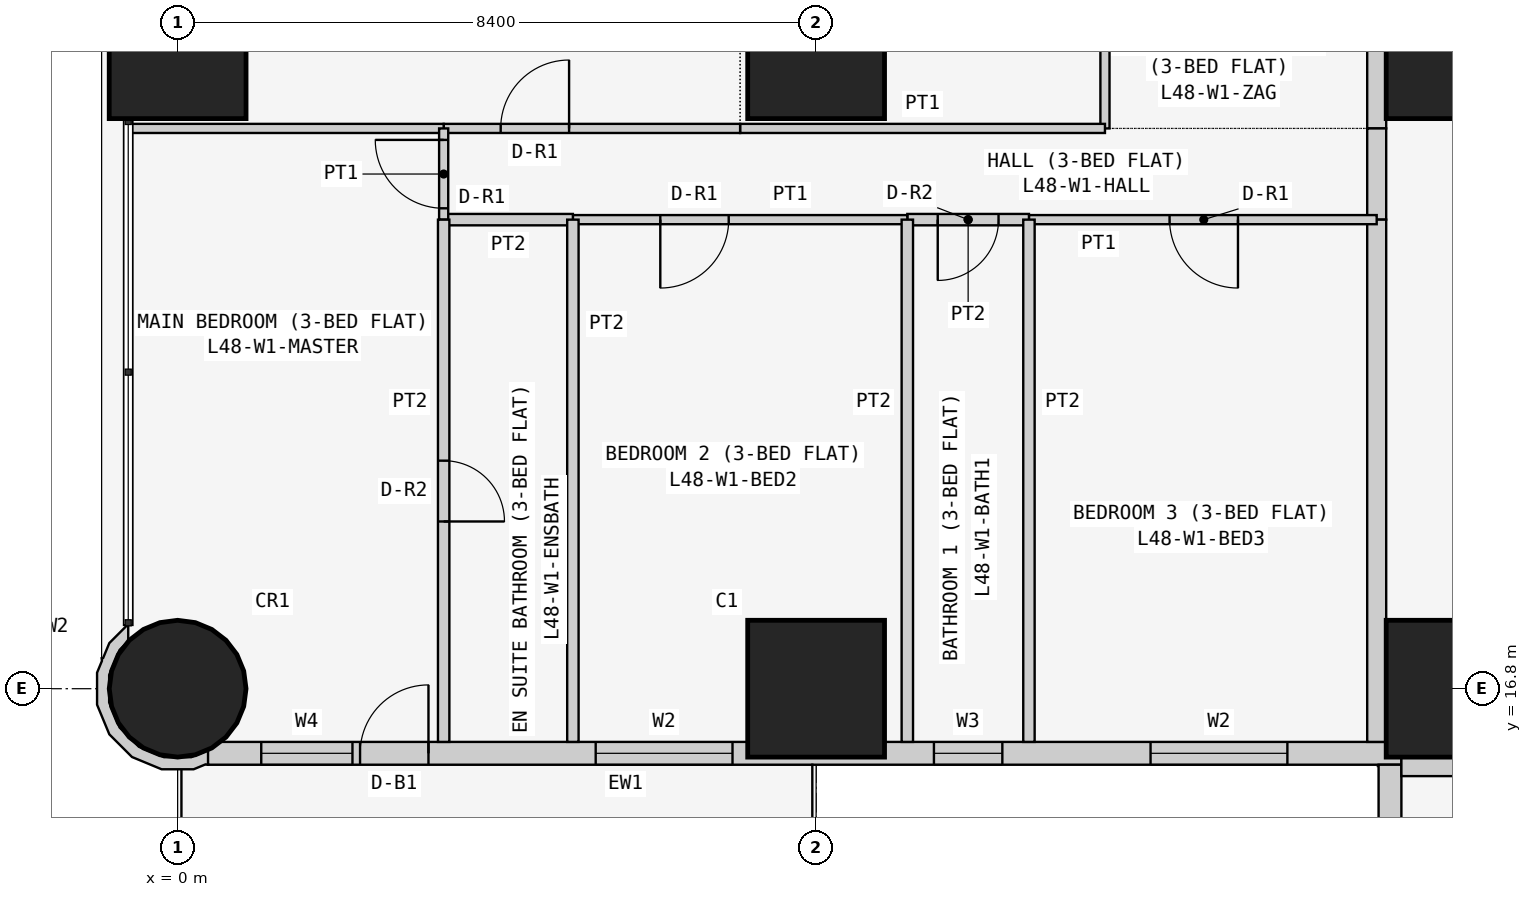
"""IFC4 building model, lengths in metres.
Left out: names, types, materials, properties, quantities, classifications, styles, units other than length and angle.
Written with IfcOpenShell. Run it as: python <this file> out.ifc"""

import sys

from ifc_helpers import new_model, si_unit, direction, frame, frame_2d, origin, origin_2d, place, context, subcontext, project, spatial, polyline, rectangle, circle, outline, extrude, element, fill, save


model = new_model("IFC4")
c1 = context("Model", 3, precision=1e-05, world=origin(), true_north=direction((0.0, 1.0)))
c2 = subcontext(c1, "Body", "Model", "MODEL_VIEW")
j1 = project(units=[si_unit("LENGTHUNIT", "METRE"), si_unit("PLANEANGLEUNIT", "RADIAN")], contexts=[c1])
p1 = place(None, origin())
s1 = spatial("IfcSite", under=j1, at=p1, CompositionType="ELEMENT")
p2 = place(p1, origin())
s2 = spatial("IfcBuilding", under=s1, at=p2, CompositionType="ELEMENT")
p3 = place(p2, frame((0.0, 0.0, 186.9)))
s3 = spatial("IfcBuildingStorey", under=s2, at=p3, CompositionType="ELEMENT", Elevation=186.9)
p4 = place(p3, frame((0.0, 16.8, 0.0), z_axis=(0.0, 0.0, 1.0), x_axis=(1.0, 0.0, 0.0)))
e1 = element("IfcColumn", 1, at=p4, inside=s3, PredefinedType="COLUMN", context=c2, shape_type="SweptSolid", body=[
    extrude(circle(Radius=0.9, at=origin_2d()), origin(), (0.0, 0.0, 1.0), 3.6),
])
for number, where, z_axis, x_axis in (
    (2, (0.0, 25.2, 0.0), (0.0, 0.0, 1.0), (1.0, 0.0, 0.0)),
    (3, (8.4, 16.8, 0.0), (0.0, 0.0, 1.0), (1.0, 0.0, 0.0)),
    (4, (8.4, 25.2, 0.0), (0.0, 0.0, 1.0), (1.0, 0.0, 0.0)),
    (5, (16.8, 16.8, 0.0), (0.0, 0.0, 1.0), (1.0, 0.0, 0.0)),
    (6, (16.8, 25.2, 0.0), (0.0, 0.0, 1.0), (1.0, 0.0, 0.0)),
):
    element("IfcColumn", number, at=place(p3, frame(where, z_axis=z_axis, x_axis=x_axis)), inside=s3, PredefinedType="COLUMN", context=c2, shape_type="SweptSolid", body=[
        extrude(rectangle(XDim=1.8, YDim=1.8, at=origin_2d()), origin(), (0.0, 0.0, 1.0), 3.6),
    ])
p5 = place(p3, frame((0.4, 15.95, 0.0), z_axis=(0.0, 0.0, 1.0), x_axis=(1.0, 0.0, 0.0)))
e7 = element("IfcWall", 7, at=p5, inside=s3, PredefinedType="SOLIDWALL", context=c2, shape_type="SweptSolid", body=[
    extrude(rectangle(XDim=15.7, YDim=0.3, at=frame_2d((7.85, 0.0))), origin(), (0.0, 0.0, 1.0), 3.45),
])
p6 = place(p5, frame((12.4, 0.0, 0.9)))
e8 = element("IfcOpeningElement", 8, at=p6, cuts=e7, PredefinedType="OPENING", context=c2, shape_type="SweptSolid", body=[
    extrude(rectangle(XDim=1.8, YDim=1.5, at=frame_2d((0.9, 0.75))), frame((0.0, 0.16, 0.0), z_axis=(0.0, -1.0, 0.0), x_axis=(1.0, 0.0, 0.0)), (0.0, 0.0, 1.0), 0.32),
])
p7 = place(p5, frame((9.55, 0.0, 1.5)))
e9 = element("IfcOpeningElement", 9, at=p7, cuts=e7, PredefinedType="OPENING", context=c2, shape_type="SweptSolid", body=[
    extrude(rectangle(XDim=0.9, YDim=0.7, at=frame_2d((0.45, 0.35))), frame((0.0, 0.16, 0.0), z_axis=(0.0, -1.0, 0.0), x_axis=(1.0, 0.0, 0.0)), (0.0, 0.0, 1.0), 0.32),
])
p8 = place(p5, frame((5.1, 0.0, 0.9)))
e10 = element("IfcOpeningElement", 10, at=p8, cuts=e7, PredefinedType="OPENING", context=c2, shape_type="SweptSolid", body=[
    extrude(rectangle(XDim=1.8, YDim=1.5, at=frame_2d((0.9, 0.75))), frame((0.0, 0.16, 0.0), z_axis=(0.0, -1.0, 0.0), x_axis=(1.0, 0.0, 0.0)), (0.0, 0.0, 1.0), 0.32),
])
p9 = place(p5, frame((2.0, 0.0, 0.0)))
e11 = element("IfcOpeningElement", 11, at=p9, cuts=e7, PredefinedType="OPENING", context=c2, shape_type="SweptSolid", body=[
    extrude(rectangle(XDim=0.9, YDim=2.4, at=frame_2d((0.45, 1.2))), frame((0.0, 0.16, 0.0), z_axis=(0.0, -1.0, 0.0), x_axis=(1.0, 0.0, 0.0)), (0.0, 0.0, 1.0), 0.32),
])
p10 = place(p5, frame((0.7, 0.0, 0.9)))
e12 = element("IfcOpeningElement", 12, at=p10, cuts=e7, PredefinedType="OPENING", context=c2, shape_type="SweptSolid", body=[
    extrude(rectangle(XDim=1.2, YDim=1.5, at=frame_2d((0.6, 0.75))), frame((0.0, 0.16, 0.0), z_axis=(0.0, -1.0, 0.0), x_axis=(1.0, 0.0, 0.0)), (0.0, 0.0, 1.0), 0.32),
])
p11 = place(p3, frame((15.95, 15.8, 0.0), z_axis=(0.0, 0.0, 1.0), x_axis=(0.0, -1.0, 0.0)))
e13 = element("IfcWall", 13, at=p11, inside=s3, PredefinedType="SOLIDWALL", context=c2, shape_type="SweptSolid", body=[
    extrude(rectangle(XDim=7.0, YDim=0.3, at=frame_2d((3.5, 0.0))), origin(), (0.0, 0.0, 1.0), 3.45),
])
p12 = place(p11, frame((1.5, 0.0, 0.9)))
e14 = element("IfcOpeningElement", 14, at=p12, cuts=e13, PredefinedType="OPENING", context=c2, shape_type="SweptSolid", body=[
    extrude(rectangle(XDim=2.4, YDim=1.5, at=frame_2d((1.2, 0.75))), frame((0.0, 0.16, 0.0), z_axis=(0.0, -1.0, 0.0), x_axis=(1.0, 0.0, 0.0)), (0.0, 0.0, 1.0), 0.32),
])
p13 = place(p11, frame((5.05, 0.0, 0.9)))
e15 = element("IfcOpeningElement", 15, at=p13, cuts=e13, PredefinedType="OPENING", context=c2, shape_type="SweptSolid", body=[
    extrude(rectangle(XDim=1.2, YDim=1.5, at=frame_2d((0.6, 0.75))), frame((0.0, 0.16, 0.0), z_axis=(0.0, -1.0, 0.0), x_axis=(1.0, 0.0, 0.0)), (0.0, 0.0, 1.0), 0.32),
])
p14 = place(p3, frame((-0.611, 17.567, 0.0), z_axis=(0.0, 0.0, 1.0), x_axis=(-0.926129809145, -0.377204953059, 0.0)))
e16 = element("IfcWall", 16, at=p14, inside=s3, PredefinedType="SOLIDWALL", context=c2, shape_type="SweptSolid", body=[
    extrude(outline(polyline([(-0.269, 2.017), (-0.37, 1.841), (-0.102, 1.842), (0.23, 1.707), (0.485, 1.455), (0.624, 1.125), (0.626, 0.766), (0.49, 0.434), (0.239, 0.179), (0.09, 0.117), (0.011, -0.078), (0.024, -0.083), (0.33, 0.045), (0.48, 0.197), (0.499, 0.193), (0.508, 0.225), (0.626, 0.345), (0.785, 0.736), (0.782, 1.157), (0.619, 1.546), (0.319, 1.842), (-0.072, 2.001), (-0.24, 2.0), (-0.269, 2.017)])), origin(), (0.0, 0.0, 1.0), 3.45),
])
p15 = place(p3, frame((22.971, 15.775, 0.0), z_axis=(0.0, 0.0, 1.0), x_axis=(-1.0, 0.0, 0.0)))
e17 = element("IfcWall", 17, at=p15, inside=s3, PredefinedType="PARTITIONING", context=c2, shape_type="SweptSolid", body=[
    extrude(rectangle(XDim=6.871, YDim=0.25, at=frame_2d((3.436, 0.0))), origin(), (0.0, 0.0, 1.0), 3.45),
])
p16 = place(p3, frame((15.775, 24.171, 0.0), z_axis=(0.0, 0.0, 1.0), x_axis=(0.0, 1.0, 0.0)))
e18 = element("IfcWall", 18, at=p16, inside=s3, PredefinedType="PARTITIONING", context=c2, shape_type="SweptSolid", body=[
    extrude(rectangle(XDim=5.229, YDim=0.25, at=frame_2d((2.615, 0.0))), origin(), (0.0, 0.0, 1.0), 3.45),
])
p17 = place(p16, frame((2.129, 0.0, 0.0)))
e19 = element("IfcOpeningElement", 19, at=p17, cuts=e18, PredefinedType="OPENING", context=c2, shape_type="SweptSolid", body=[
    extrude(rectangle(XDim=1.0, YDim=2.1, at=frame_2d((0.5, 1.05))), frame((0.0, 0.135, 0.0), z_axis=(0.0, -1.0, 0.0), x_axis=(1.0, 0.0, 0.0)), (0.0, 0.0, 1.0), 0.27),
])
p18 = place(p3, frame((15.775, 22.971, 0.0), z_axis=(0.0, 0.0, 1.0), x_axis=(0.0, 1.0, 0.0)))
e20 = element("IfcWall", 20, at=p18, inside=s3, PredefinedType="PARTITIONING", context=c2, shape_type="SweptSolid", body=[
    extrude(rectangle(XDim=1.2, YDim=0.25, at=frame_2d((0.6, 0.0))), origin(), (0.0, 0.0, 1.0), 3.45),
])
p19 = place(p3, frame((15.775, 16.1, 0.0), z_axis=(0.0, 0.0, 1.0), x_axis=(0.0, 1.0, 0.0)))
e21 = element("IfcWall", 21, at=p19, inside=s3, PredefinedType="PARTITIONING", context=c2, shape_type="SweptSolid", body=[
    extrude(rectangle(XDim=6.871, YDim=0.25, at=frame_2d((3.436, 0.0))), origin(), (0.0, 0.0, 1.0), 3.45),
])
p20 = place(p3, frame((12.2, 29.4, 0.0), z_axis=(0.0, 0.0, 1.0), x_axis=(0.0, -1.0, 0.0)))
e22 = element("IfcWall", 22, at=p20, inside=s3, PredefinedType="PARTITIONING", context=c2, shape_type="SweptSolid", body=[
    extrude(rectangle(XDim=5.229, YDim=0.12, at=frame_2d((2.615, 0.0))), origin(), (0.0, 0.0, 1.0), 3.45),
])
p21 = place(p20, frame((1.05, 0.0, 0.0)))
e23 = element("IfcOpeningElement", 23, at=p21, cuts=e22, PredefinedType="OPENING", context=c2, shape_type="SweptSolid", body=[
    extrude(rectangle(XDim=0.9, YDim=2.1, at=frame_2d((0.45, 1.05))), frame((0.0, 0.07, 0.0), z_axis=(0.0, -1.0, 0.0), x_axis=(1.0, 0.0, 0.0)), (0.0, 0.0, 1.0), 0.14),
])
p22 = place(p3, frame((7.4, 24.171, 0.0), z_axis=(0.0, 0.0, 1.0), x_axis=(1.0, 0.0, 0.0)))
e24 = element("IfcWall", 24, at=p22, inside=s3, PredefinedType="PARTITIONING", context=c2, shape_type="SweptSolid", body=[
    extrude(rectangle(XDim=4.8, YDim=0.12, at=frame_2d((2.4, 0.0))), origin(), (0.0, 0.0, 1.0), 3.45),
])
p23 = place(p3, frame((3.5, 24.171, 0.0), z_axis=(0.0, 0.0, 1.0), x_axis=(1.0, 0.0, 0.0)))
e25 = element("IfcWall", 25, at=p23, inside=s3, PredefinedType="PARTITIONING", context=c2, shape_type="SweptSolid", body=[
    extrude(rectangle(XDim=3.9, YDim=0.12, at=frame_2d((1.95, 0.0))), origin(), (0.0, 0.0, 1.0), 3.45),
])
p24 = place(p23, frame((0.75, 0.0, 0.0)))
e26 = element("IfcOpeningElement", 26, at=p24, cuts=e25, PredefinedType="OPENING", context=c2, shape_type="SweptSolid", body=[
    extrude(rectangle(XDim=0.9, YDim=2.1, at=frame_2d((0.45, 1.05))), frame((0.0, 0.07, 0.0), z_axis=(0.0, -1.0, 0.0), x_axis=(1.0, 0.0, 0.0)), (0.0, 0.0, 1.0), 0.14),
])
p25 = place(p3, frame((-0.65, 24.171, 0.0), z_axis=(0.0, 0.0, 1.0), x_axis=(1.0, 0.0, 0.0)))
e27 = element("IfcWall", 27, at=p25, inside=s3, PredefinedType="PARTITIONING", context=c2, shape_type="SweptSolid", body=[
    extrude(rectangle(XDim=4.15, YDim=0.12, at=frame_2d((2.075, 0.0))), origin(), (0.0, 0.0, 1.0), 3.45),
])
p26 = place(p3, frame((11.2, 22.971, 0.0), z_axis=(0.0, 0.0, 1.0), x_axis=(1.0, 0.0, 0.0)))
e28 = element("IfcWall", 28, at=p26, inside=s3, PredefinedType="PARTITIONING", context=c2, shape_type="SweptSolid", body=[
    extrude(rectangle(XDim=4.575, YDim=0.12, at=frame_2d((2.288, 0.0))), origin(), (0.0, 0.0, 1.0), 3.45),
])
p27 = place(p26, frame((1.85, 0.0, 0.0)))
e29 = element("IfcOpeningElement", 29, at=p27, cuts=e28, PredefinedType="OPENING", context=c2, shape_type="SweptSolid", body=[
    extrude(rectangle(XDim=0.9, YDim=2.1, at=frame_2d((0.45, 1.05))), frame((0.0, 0.07, 0.0), z_axis=(0.0, -1.0, 0.0), x_axis=(1.0, 0.0, 0.0)), (0.0, 0.0, 1.0), 0.14),
])
p28 = place(p3, frame((9.6, 22.971, 0.0), z_axis=(0.0, 0.0, 1.0), x_axis=(1.0, 0.0, 0.0)))
e30 = element("IfcWall", 30, at=p28, inside=s3, PredefinedType="PARTITIONING", context=c2, shape_type="SweptSolid", body=[
    extrude(rectangle(XDim=1.6, YDim=0.15, at=frame_2d((0.8, 0.0))), origin(), (0.0, 0.0, 1.0), 3.45),
])
p29 = place(p28, frame((0.4, 0.0, 0.0)))
e31 = element("IfcOpeningElement", 31, at=p29, cuts=e30, PredefinedType="OPENING", context=c2, shape_type="SweptSolid", body=[
    extrude(rectangle(XDim=0.8, YDim=2.1, at=frame_2d((0.4, 1.05))), frame((0.0, 0.085, 0.0), z_axis=(0.0, -1.0, 0.0), x_axis=(1.0, 0.0, 0.0)), (0.0, 0.0, 1.0), 0.17),
])
p30 = place(p3, frame((5.2, 22.971, 0.0), z_axis=(0.0, 0.0, 1.0), x_axis=(1.0, 0.0, 0.0)))
e32 = element("IfcWall", 32, at=p30, inside=s3, PredefinedType="PARTITIONING", context=c2, shape_type="SweptSolid", body=[
    extrude(rectangle(XDim=4.4, YDim=0.12, at=frame_2d((2.2, 0.0))), origin(), (0.0, 0.0, 1.0), 3.45),
])
p31 = place(p30, frame((1.15, 0.0, 0.0)))
e33 = element("IfcOpeningElement", 33, at=p31, cuts=e32, PredefinedType="OPENING", context=c2, shape_type="SweptSolid", body=[
    extrude(rectangle(XDim=0.9, YDim=2.1, at=frame_2d((0.45, 1.05))), frame((0.0, 0.07, 0.0), z_axis=(0.0, -1.0, 0.0), x_axis=(1.0, 0.0, 0.0)), (0.0, 0.0, 1.0), 0.14),
])
p32 = place(p3, frame((3.5, 22.971, 0.0), z_axis=(0.0, 0.0, 1.0), x_axis=(1.0, 0.0, 0.0)))
e34 = element("IfcWall", 34, at=p32, inside=s3, PredefinedType="PARTITIONING", context=c2, shape_type="SweptSolid", body=[
    extrude(rectangle(XDim=1.7, YDim=0.15, at=frame_2d((0.85, 0.0))), origin(), (0.0, 0.0, 1.0), 3.45),
])
p33 = place(p3, frame((3.5, 24.171, 0.0), z_axis=(0.0, 0.0, 1.0), x_axis=(0.0, -1.0, 0.0)))
e35 = element("IfcWall", 35, at=p33, inside=s3, PredefinedType="PARTITIONING", context=c2, shape_type="SweptSolid", body=[
    extrude(rectangle(XDim=1.2, YDim=0.12, at=frame_2d((0.6, 0.0))), origin(), (0.0, 0.0, 1.0), 3.45),
])
p34 = place(p33, frame((0.151, 0.0, 0.0)))
e36 = element("IfcOpeningElement", 36, at=p34, cuts=e35, PredefinedType="OPENING", context=c2, shape_type="SweptSolid", body=[
    extrude(rectangle(XDim=0.9, YDim=2.1, at=frame_2d((0.45, 1.05))), frame((0.0, 0.07, 0.0), z_axis=(0.0, -1.0, 0.0), x_axis=(1.0, 0.0, 0.0)), (0.0, 0.0, 1.0), 0.14),
])
for number, where, z_axis, x_axis in (
    (37, (11.2, 22.971, 0.0), (0.0, 0.0, 1.0), (0.0, -1.0, 0.0)),
    (38, (9.6, 22.971, 0.0), (0.0, 0.0, 1.0), (0.0, -1.0, 0.0)),
    (39, (5.2, 22.971, 0.0), (0.0, 0.0, 1.0), (0.0, -1.0, 0.0)),
):
    element("IfcWall", number, at=place(p3, frame(where, z_axis=z_axis, x_axis=x_axis)), inside=s3, PredefinedType="PARTITIONING", context=c2, shape_type="SweptSolid", body=[
        extrude(rectangle(XDim=6.871, YDim=0.15, at=frame_2d((3.436, 0.0))), origin(), (0.0, 0.0, 1.0), 3.45),
    ])
p35 = place(p3, frame((3.5, 22.971, 0.0), z_axis=(0.0, 0.0, 1.0), x_axis=(0.0, -1.0, 0.0)))
e40 = element("IfcWall", 40, at=p35, inside=s3, PredefinedType="PARTITIONING", context=c2, shape_type="SweptSolid", body=[
    extrude(rectangle(XDim=6.871, YDim=0.15, at=frame_2d((3.436, 0.0))), origin(), (0.0, 0.0, 1.0), 3.45),
])
p36 = place(p35, frame((3.171, 0.0, 0.0)))
e41 = element("IfcOpeningElement", 41, at=p36, cuts=e40, PredefinedType="OPENING", context=c2, shape_type="SweptSolid", body=[
    extrude(rectangle(XDim=0.8, YDim=2.1, at=frame_2d((0.4, 1.05))), frame((0.0, 0.085, 0.0), z_axis=(0.0, -1.0, 0.0), x_axis=(1.0, 0.0, 0.0)), (0.0, 0.0, 1.0), 0.17),
])
p37 = place(p6, origin())
e42 = element("IfcWindow", 42, at=p37, inside=s3, PartitioningType="SINGLE_PANEL", PredefinedType="WINDOW", context=c2, shape_type="SweptSolid", body=[
    extrude(rectangle(XDim=1.8, YDim=1.5, at=frame_2d((0.9, 0.75))), frame((0.0, 0.03, 0.0), z_axis=(0.0, -1.0, 0.0), x_axis=(1.0, 0.0, 0.0)), (0.0, 0.0, 1.0), 0.06),
])
fill(e8, e42)
p38 = place(p7, origin())
e43 = element("IfcWindow", 43, at=p38, inside=s3, PartitioningType="SINGLE_PANEL", PredefinedType="WINDOW", context=c2, shape_type="SweptSolid", body=[
    extrude(rectangle(XDim=0.9, YDim=0.7, at=frame_2d((0.45, 0.35))), frame((0.0, 0.03, 0.0), z_axis=(0.0, -1.0, 0.0), x_axis=(1.0, 0.0, 0.0)), (0.0, 0.0, 1.0), 0.06),
])
fill(e9, e43)
p39 = place(p8, origin())
e44 = element("IfcWindow", 44, at=p39, inside=s3, PartitioningType="SINGLE_PANEL", PredefinedType="WINDOW", context=c2, shape_type="SweptSolid", body=[
    extrude(rectangle(XDim=1.8, YDim=1.5, at=frame_2d((0.9, 0.75))), frame((0.0, 0.03, 0.0), z_axis=(0.0, -1.0, 0.0), x_axis=(1.0, 0.0, 0.0)), (0.0, 0.0, 1.0), 0.06),
])
fill(e10, e44)
p40 = place(p9, origin())
e45 = element("IfcDoor", 45, at=p40, inside=s3, OperationType="SINGLE_SWING_RIGHT", PredefinedType="DOOR", context=c2, shape_type="SweptSolid", body=[
    extrude(rectangle(XDim=0.9, YDim=2.4, at=frame_2d((0.45, 1.2))), frame((0.0, 0.025, 0.0), z_axis=(0.0, -1.0, 0.0), x_axis=(1.0, 0.0, 0.0)), (0.0, 0.0, 1.0), 0.05),
])
fill(e11, e45)
p41 = place(p10, origin())
e46 = element("IfcWindow", 46, at=p41, inside=s3, PartitioningType="SINGLE_PANEL", PredefinedType="WINDOW", context=c2, shape_type="SweptSolid", body=[
    extrude(rectangle(XDim=1.2, YDim=1.5, at=frame_2d((0.6, 0.75))), frame((0.0, 0.03, 0.0), z_axis=(0.0, -1.0, 0.0), x_axis=(1.0, 0.0, 0.0)), (0.0, 0.0, 1.0), 0.06),
])
fill(e12, e46)
p42 = place(p24, origin())
e47 = element("IfcDoor", 47, at=p42, inside=s3, OperationType="SINGLE_SWING_RIGHT", PredefinedType="DOOR", context=c2, shape_type="SweptSolid", body=[
    extrude(rectangle(XDim=0.9, YDim=2.1, at=frame_2d((0.45, 1.05))), frame((0.0, 0.025, 0.0), z_axis=(0.0, -1.0, 0.0), x_axis=(1.0, 0.0, 0.0)), (0.0, 0.0, 1.0), 0.05),
])
fill(e26, e47)
p43 = place(p27, frame((0.9, 0.0, 0.0), z_axis=(0.0, 0.0, 1.0), x_axis=(-1.0, 0.0, 0.0)))
e48 = element("IfcDoor", 48, at=p43, inside=s3, OperationType="SINGLE_SWING_LEFT", PredefinedType="DOOR", context=c2, shape_type="SweptSolid", body=[
    extrude(rectangle(XDim=0.9, YDim=2.1, at=frame_2d((0.45, 1.05))), frame((0.0, 0.025, 0.0), z_axis=(0.0, -1.0, 0.0), x_axis=(1.0, 0.0, 0.0)), (0.0, 0.0, 1.0), 0.05),
])
fill(e29, e48)
p44 = place(p29, frame((0.8, 0.0, 0.0), z_axis=(0.0, 0.0, 1.0), x_axis=(-1.0, 0.0, 0.0)))
e49 = element("IfcDoor", 49, at=p44, inside=s3, OperationType="SINGLE_SWING_RIGHT", PredefinedType="DOOR", context=c2, shape_type="SweptSolid", body=[
    extrude(rectangle(XDim=0.8, YDim=2.1, at=frame_2d((0.4, 1.05))), frame((0.0, 0.025, 0.0), z_axis=(0.0, -1.0, 0.0), x_axis=(1.0, 0.0, 0.0)), (0.0, 0.0, 1.0), 0.05),
])
fill(e31, e49)
p45 = place(p31, frame((0.9, 0.0, 0.0), z_axis=(0.0, 0.0, 1.0), x_axis=(-1.0, 0.0, 0.0)))
e50 = element("IfcDoor", 50, at=p45, inside=s3, OperationType="SINGLE_SWING_RIGHT", PredefinedType="DOOR", context=c2, shape_type="SweptSolid", body=[
    extrude(rectangle(XDim=0.9, YDim=2.1, at=frame_2d((0.45, 1.05))), frame((0.0, 0.025, 0.0), z_axis=(0.0, -1.0, 0.0), x_axis=(1.0, 0.0, 0.0)), (0.0, 0.0, 1.0), 0.05),
])
fill(e33, e50)
p46 = place(p34, frame((0.9, 0.0, 0.0), z_axis=(0.0, 0.0, 1.0), x_axis=(-1.0, 0.0, 0.0)))
e51 = element("IfcDoor", 51, at=p46, inside=s3, OperationType="SINGLE_SWING_RIGHT", PredefinedType="DOOR", context=c2, shape_type="SweptSolid", body=[
    extrude(rectangle(XDim=0.9, YDim=2.1, at=frame_2d((0.45, 1.05))), frame((0.0, 0.025, 0.0), z_axis=(0.0, -1.0, 0.0), x_axis=(1.0, 0.0, 0.0)), (0.0, 0.0, 1.0), 0.05),
])
fill(e36, e51)
p47 = place(p36, origin())
e52 = element("IfcDoor", 52, at=p47, inside=s3, OperationType="SINGLE_SWING_RIGHT", PredefinedType="DOOR", context=c2, shape_type="SweptSolid", body=[
    extrude(rectangle(XDim=0.8, YDim=2.1, at=frame_2d((0.4, 1.05))), frame((0.0, 0.025, 0.0), z_axis=(0.0, -1.0, 0.0), x_axis=(1.0, 0.0, 0.0)), (0.0, 0.0, 1.0), 0.05),
])
fill(e41, e52)
save(model, sys.argv[1])
